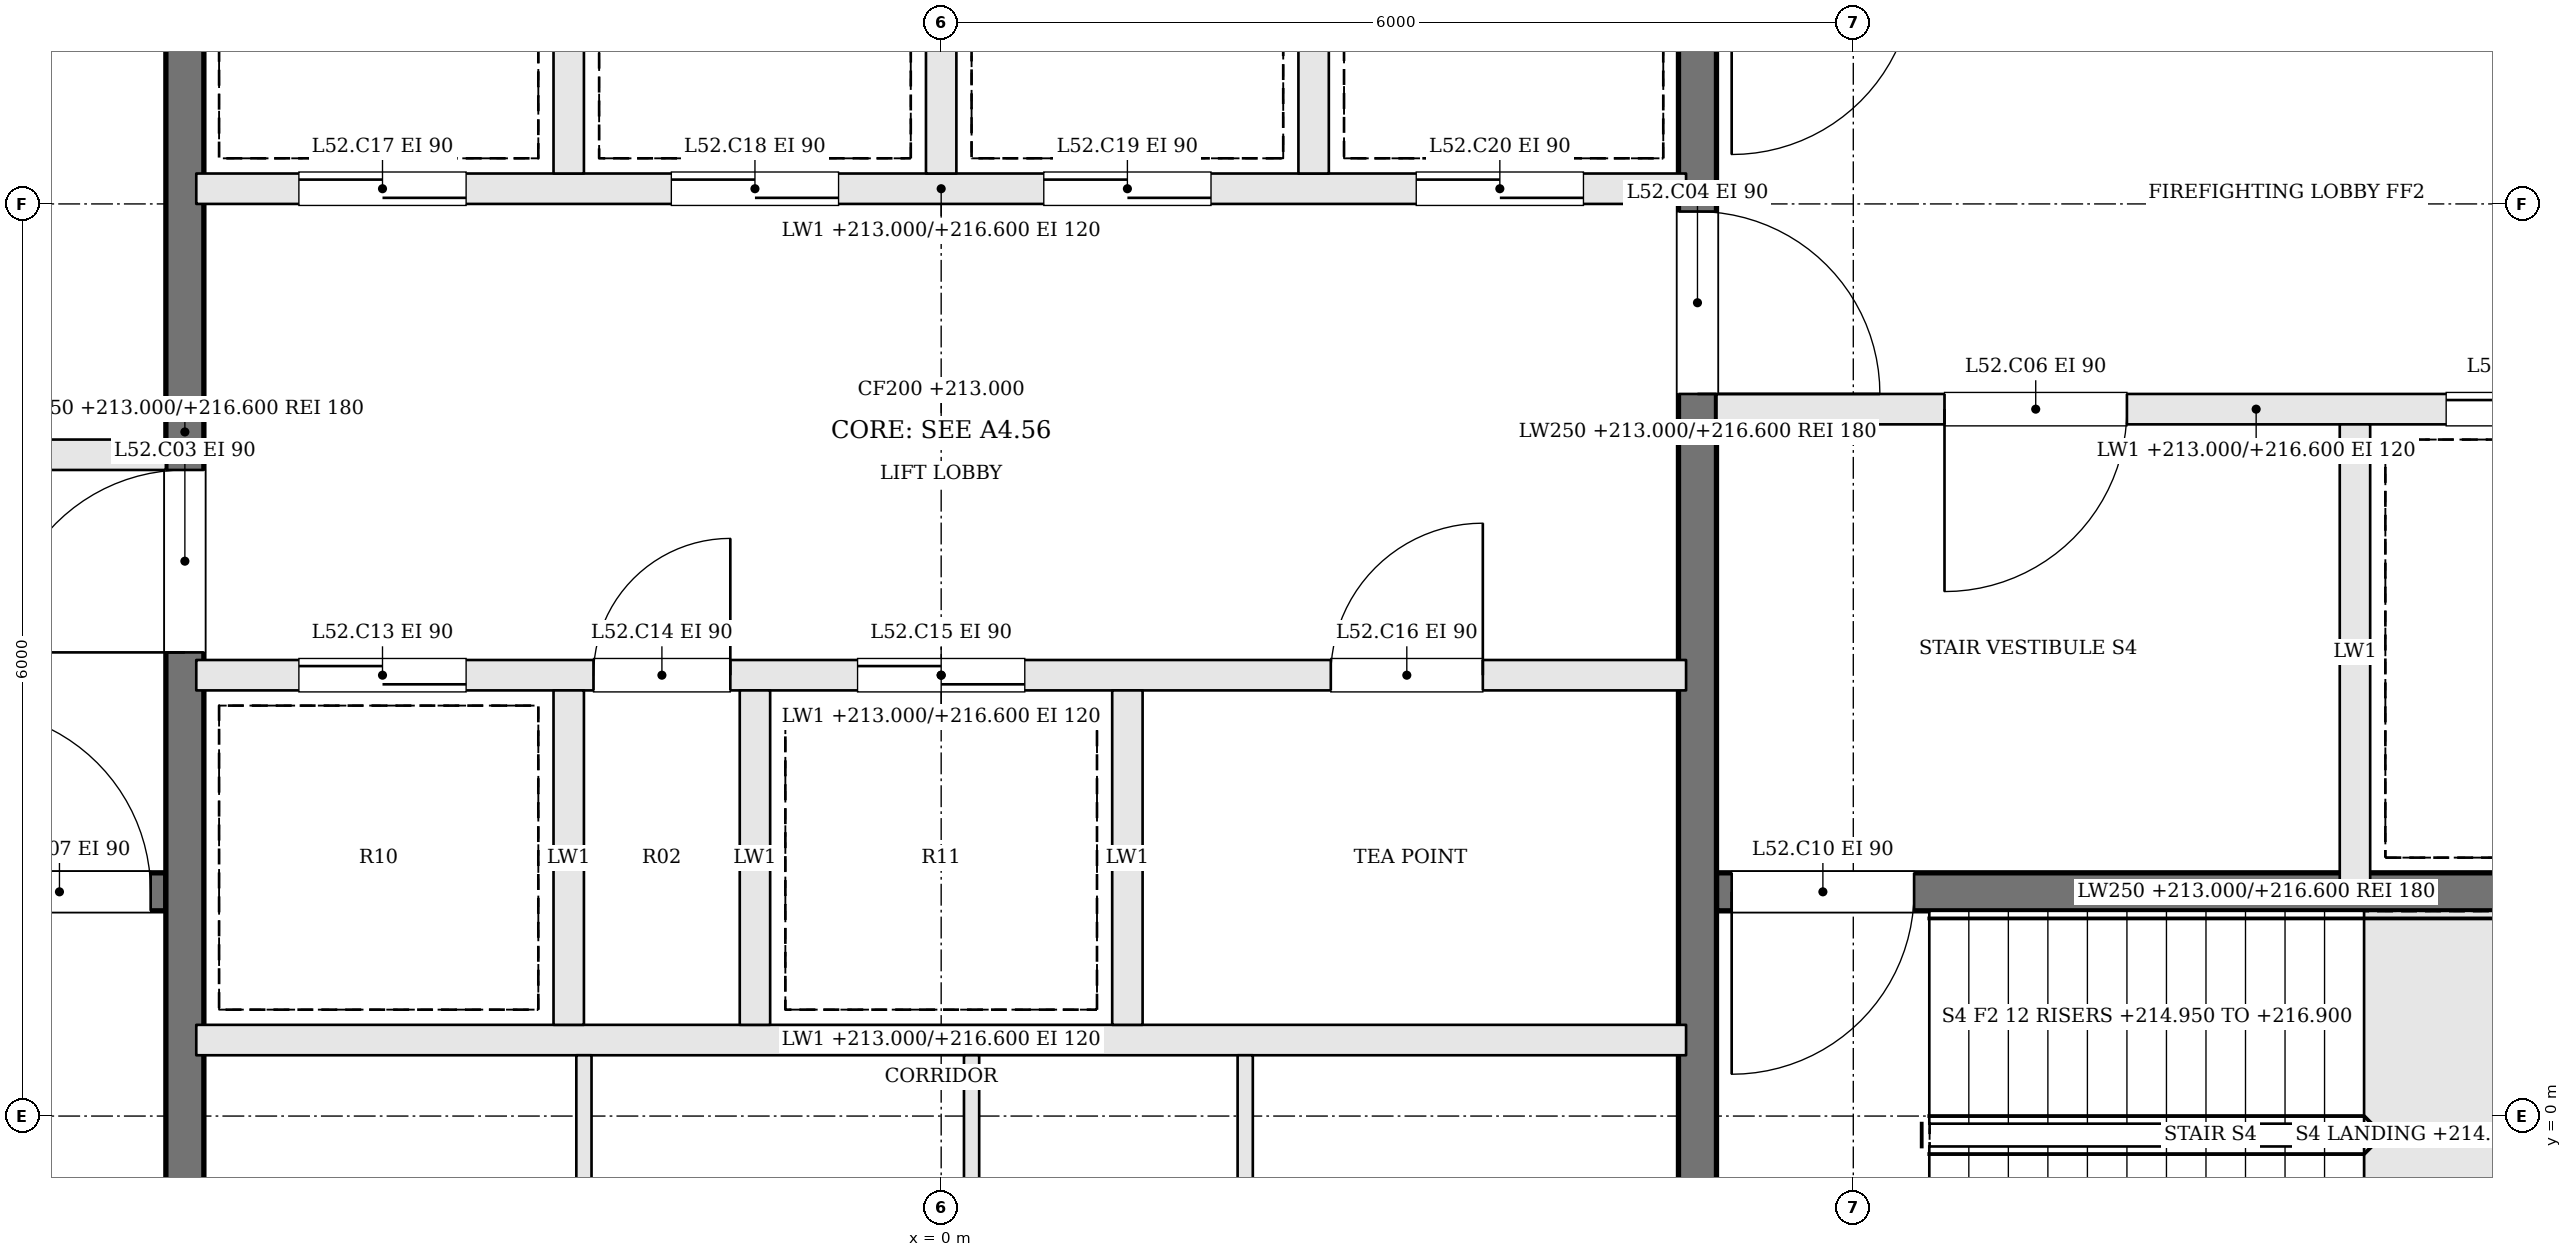
"""IFC4 building model, lengths in metres.
Left out: names, types, materials, properties, quantities, classifications, styles, units other than length and angle.
Written with IfcOpenShell. Run it as: python <this file> out.ifc"""

import sys

from ifc_helpers import new_model, si_unit, direction, frame, frame_2d, origin, place, context, subcontext, project, spatial, rectangle, extrude, element, fill, save


model = new_model("IFC4")
c1 = context("Model", 3, precision=1e-05, world=origin(), true_north=direction((0.0, 1.0)))
c2 = subcontext(c1, "Body", "Model", "MODEL_VIEW")
j1 = project(units=[si_unit("LENGTHUNIT", "METRE"), si_unit("PLANEANGLEUNIT", "RADIAN")], contexts=[c1])
p1 = place(None, origin())
s1 = spatial("IfcSite", under=j1, at=p1, CompositionType="ELEMENT")
p2 = place(p1, origin())
s2 = spatial("IfcBuilding", under=s1, at=p2, CompositionType="ELEMENT")
p3 = place(p2, frame((0.0, 0.0, 213.0)))
s3 = spatial("IfcBuildingStorey", under=s2, at=p3, CompositionType="ELEMENT", Elevation=213.0)
p4 = place(p3, frame((-12.2, 1.475, 0.0), z_axis=(0.0, 0.0, 1.0), x_axis=(1.0, 0.0, 0.0)))
e1 = element("IfcWall", 1, at=p4, inside=s3, PredefinedType="SOLIDWALL", context=c2, shape_type="SweptSolid", body=[
    extrude(rectangle(XDim=7.1, YDim=0.25, at=frame_2d((3.55, 0.0))), origin(), (0.0, 0.0, 1.0), 3.6),
])
p5 = place(p4, frame((5.8, 0.0, 0.0)))
e2 = element("IfcOpeningElement", 2, at=p5, cuts=e1, PredefinedType="OPENING", context=c2, shape_type="SweptSolid", body=[
    extrude(rectangle(XDim=1.2, YDim=2.1, at=frame_2d((0.6, 1.05))), frame((0.0, 0.135, 0.0), z_axis=(0.0, -1.0, 0.0), x_axis=(1.0, 0.0, 0.0)), (0.0, 0.0, 1.0), 0.27),
])
p6 = place(p3, frame((-12.2, 4.35, 0.0), z_axis=(0.0, 0.0, 1.0), x_axis=(1.0, 0.0, 0.0)))
e3 = element("IfcWall", 3, at=p6, inside=s3, PredefinedType="SOLIDWALL", context=c2, shape_type="SweptSolid", body=[
    extrude(rectangle(XDim=7.1, YDim=0.2, at=frame_2d((3.55, 0.0))), origin(), (0.0, 0.0, 1.0), 3.6),
])
p7 = place(p6, frame((4.4, 0.0, 0.0)))
e4 = element("IfcOpeningElement", 4, at=p7, cuts=e3, PredefinedType="OPENING", context=c2, shape_type="SweptSolid", body=[
    extrude(rectangle(XDim=1.2, YDim=2.1, at=frame_2d((0.6, 1.05))), frame((0.0, 0.11, 0.0), z_axis=(0.0, -1.0, 0.0), x_axis=(1.0, 0.0, 0.0)), (0.0, 0.0, 1.0), 0.22),
])
p8 = place(p6, frame((1.1, 0.0, 0.0)))
e5 = element("IfcOpeningElement", 5, at=p8, cuts=e3, PredefinedType="OPENING", context=c2, shape_type="SweptSolid", body=[
    extrude(rectangle(XDim=1.2, YDim=2.1, at=frame_2d((0.6, 1.05))), frame((0.0, 0.11, 0.0), z_axis=(0.0, -1.0, 0.0), x_axis=(1.0, 0.0, 0.0)), (0.0, 0.0, 1.0), 0.22),
])
p9 = place(p3, frame((12.2, 4.65, 0.0), z_axis=(0.0, 0.0, 1.0), x_axis=(-1.0, 0.0, 0.0)))
e6 = element("IfcWall", 6, at=p9, inside=s3, PredefinedType="SOLIDWALL", context=c2, shape_type="SweptSolid", body=[
    extrude(rectangle(XDim=7.1, YDim=0.2, at=frame_2d((3.55, 0.0))), origin(), (0.0, 0.0, 1.0), 3.6),
])
p10 = place(p9, frame((4.4, 0.0, 0.0)))
e7 = element("IfcOpeningElement", 7, at=p10, cuts=e6, PredefinedType="OPENING", context=c2, shape_type="SweptSolid", body=[
    extrude(rectangle(XDim=1.2, YDim=2.1, at=frame_2d((0.6, 1.05))), frame((0.0, 0.11, 0.0), z_axis=(0.0, -1.0, 0.0), x_axis=(1.0, 0.0, 0.0)), (0.0, 0.0, 1.0), 0.22),
])
p11 = place(p9, frame((1.1, 0.0, 0.0)))
e8 = element("IfcOpeningElement", 8, at=p11, cuts=e6, PredefinedType="OPENING", context=c2, shape_type="SweptSolid", body=[
    extrude(rectangle(XDim=1.2, YDim=2.1, at=frame_2d((0.6, 1.05))), frame((0.0, 0.11, 0.0), z_axis=(0.0, -1.0, 0.0), x_axis=(1.0, 0.0, 0.0)), (0.0, 0.0, 1.0), 0.22),
])
p12 = place(p3, frame((12.2, 1.475, 0.0), z_axis=(0.0, 0.0, 1.0), x_axis=(-1.0, 0.0, 0.0)))
e9 = element("IfcWall", 9, at=p12, inside=s3, PredefinedType="SOLIDWALL", context=c2, shape_type="SweptSolid", body=[
    extrude(rectangle(XDim=7.1, YDim=0.25, at=frame_2d((3.55, 0.0))), origin(), (0.0, 0.0, 1.0), 3.6),
])
p13 = place(p12, frame((5.8, 0.0, 0.0)))
e10 = element("IfcOpeningElement", 10, at=p13, cuts=e9, PredefinedType="OPENING", context=c2, shape_type="SweptSolid", body=[
    extrude(rectangle(XDim=1.2, YDim=2.1, at=frame_2d((0.6, 1.05))), frame((0.0, 0.135, 0.0), z_axis=(0.0, -1.0, 0.0), x_axis=(1.0, 0.0, 0.0)), (0.0, 0.0, 1.0), 0.27),
])
p14 = place(p3, frame((9.3, 4.55, 0.0), z_axis=(0.0, 0.0, 1.0), x_axis=(0.0, -1.0, 0.0)))
e11 = element("IfcWall", 11, at=p14, inside=s3, PredefinedType="SOLIDWALL", context=c2, shape_type="SweptSolid", body=[
    extrude(rectangle(XDim=3.0, YDim=0.2, at=frame_2d((1.5, 0.0))), origin(), (0.0, 0.0, 1.0), 3.6),
])
p15 = place(p3, frame((-4.975, -2.2, 0.0), z_axis=(0.0, 0.0, 1.0), x_axis=(0.0, 1.0, 0.0)))
e12 = element("IfcWall", 12, at=p15, inside=s3, PredefinedType="SOLIDWALL", context=c2, shape_type="SweptSolid", body=[
    extrude(rectangle(XDim=13.4, YDim=0.25, at=frame_2d((6.7, 0.0))), origin(), (0.0, 0.0, 1.0), 3.6),
])
p16 = place(p15, frame((5.25, 0.0, 0.0)))
e13 = element("IfcOpeningElement", 13, at=p16, cuts=e12, PredefinedType="OPENING", context=c2, shape_type="SweptSolid", body=[
    extrude(rectangle(XDim=1.2, YDim=2.1, at=frame_2d((0.6, 1.05))), frame((0.0, 0.135, 0.0), z_axis=(0.0, -1.0, 0.0), x_axis=(1.0, 0.0, 0.0)), (0.0, 0.0, 1.0), 0.27),
])
p17 = place(p3, frame((4.975, 11.2, 0.0), z_axis=(0.0, 0.0, 1.0), x_axis=(0.0, -1.0, 0.0)))
e14 = element("IfcWall", 14, at=p17, inside=s3, PredefinedType="SOLIDWALL", context=c2, shape_type="SweptSolid", body=[
    extrude(rectangle(XDim=13.4, YDim=0.25, at=frame_2d((6.7, 0.0))), origin(), (0.0, 0.0, 1.0), 3.6),
])
p18 = place(p17, frame((5.25, 0.0, 0.0)))
e15 = element("IfcOpeningElement", 15, at=p18, cuts=e14, PredefinedType="OPENING", context=c2, shape_type="SweptSolid", body=[
    extrude(rectangle(XDim=1.2, YDim=2.1, at=frame_2d((0.6, 1.05))), frame((0.0, 0.135, 0.0), z_axis=(0.0, -1.0, 0.0), x_axis=(1.0, 0.0, 0.0)), (0.0, 0.0, 1.0), 0.27),
])
p19 = place(p3, frame((-4.9, 0.5, 0.0), z_axis=(0.0, 0.0, 1.0), x_axis=(1.0, 0.0, 0.0)))
e16 = element("IfcWall", 16, at=p19, inside=s3, PredefinedType="SOLIDWALL", context=c2, shape_type="SweptSolid", body=[
    extrude(rectangle(XDim=9.8, YDim=0.2, at=frame_2d((4.9, 0.0))), origin(), (0.0, 0.0, 1.0), 3.6),
])
p20 = place(p3, frame((-4.9, 2.9, 0.0), z_axis=(0.0, 0.0, 1.0), x_axis=(1.0, 0.0, 0.0)))
e17 = element("IfcWall", 17, at=p20, inside=s3, PredefinedType="SOLIDWALL", context=c2, shape_type="SweptSolid", body=[
    extrude(rectangle(XDim=9.8, YDim=0.2, at=frame_2d((4.9, 0.0))), origin(), (0.0, 0.0, 1.0), 3.6),
])
p21 = place(p20, frame((0.675, 0.0, 0.0)))
e18 = element("IfcOpeningElement", 18, at=p21, cuts=e17, PredefinedType="OPENING", context=c2, shape_type="SweptSolid", body=[
    extrude(rectangle(XDim=1.1, YDim=2.1, at=frame_2d((0.55, 1.05))), frame((0.0, 0.11, 0.0), z_axis=(0.0, -1.0, 0.0), x_axis=(1.0, 0.0, 0.0)), (0.0, 0.0, 1.0), 0.22),
])
p22 = place(p20, frame((2.613, 0.0, 0.0)))
e19 = element("IfcOpeningElement", 19, at=p22, cuts=e17, PredefinedType="OPENING", context=c2, shape_type="SweptSolid", body=[
    extrude(rectangle(XDim=0.9, YDim=2.1, at=frame_2d((0.45, 1.05))), frame((0.0, 0.11, 0.0), z_axis=(0.0, -1.0, 0.0), x_axis=(1.0, 0.0, 0.0)), (0.0, 0.0, 1.0), 0.22),
])
p23 = place(p20, frame((4.35, 0.0, 0.0)))
e20 = element("IfcOpeningElement", 20, at=p23, cuts=e17, PredefinedType="OPENING", context=c2, shape_type="SweptSolid", body=[
    extrude(rectangle(XDim=1.1, YDim=2.1, at=frame_2d((0.55, 1.05))), frame((0.0, 0.11, 0.0), z_axis=(0.0, -1.0, 0.0), x_axis=(1.0, 0.0, 0.0)), (0.0, 0.0, 1.0), 0.22),
])
p24 = place(p20, frame((7.463, 0.0, 0.0)))
e21 = element("IfcOpeningElement", 21, at=p24, cuts=e17, PredefinedType="OPENING", context=c2, shape_type="SweptSolid", body=[
    extrude(rectangle(XDim=1.0, YDim=2.1, at=frame_2d((0.5, 1.05))), frame((0.0, 0.11, 0.0), z_axis=(0.0, -1.0, 0.0), x_axis=(1.0, 0.0, 0.0)), (0.0, 0.0, 1.0), 0.22),
])
p25 = place(p3, frame((-4.9, 6.1, 0.0), z_axis=(0.0, 0.0, 1.0), x_axis=(1.0, 0.0, 0.0)))
e22 = element("IfcWall", 22, at=p25, inside=s3, PredefinedType="SOLIDWALL", context=c2, shape_type="SweptSolid", body=[
    extrude(rectangle(XDim=9.8, YDim=0.2, at=frame_2d((4.9, 0.0))), origin(), (0.0, 0.0, 1.0), 3.6),
])
p26 = place(p25, frame((0.675, 0.0, 0.0)))
e23 = element("IfcOpeningElement", 23, at=p26, cuts=e22, PredefinedType="OPENING", context=c2, shape_type="SweptSolid", body=[
    extrude(rectangle(XDim=1.1, YDim=2.1, at=frame_2d((0.55, 1.05))), frame((0.0, 0.11, 0.0), z_axis=(0.0, -1.0, 0.0), x_axis=(1.0, 0.0, 0.0)), (0.0, 0.0, 1.0), 0.22),
])
p27 = place(p25, frame((3.125, 0.0, 0.0)))
e24 = element("IfcOpeningElement", 24, at=p27, cuts=e22, PredefinedType="OPENING", context=c2, shape_type="SweptSolid", body=[
    extrude(rectangle(XDim=1.1, YDim=2.1, at=frame_2d((0.55, 1.05))), frame((0.0, 0.11, 0.0), z_axis=(0.0, -1.0, 0.0), x_axis=(1.0, 0.0, 0.0)), (0.0, 0.0, 1.0), 0.22),
])
p28 = place(p25, frame((5.575, 0.0, 0.0)))
e25 = element("IfcOpeningElement", 25, at=p28, cuts=e22, PredefinedType="OPENING", context=c2, shape_type="SweptSolid", body=[
    extrude(rectangle(XDim=1.1, YDim=2.1, at=frame_2d((0.55, 1.05))), frame((0.0, 0.11, 0.0), z_axis=(0.0, -1.0, 0.0), x_axis=(1.0, 0.0, 0.0)), (0.0, 0.0, 1.0), 0.22),
])
p29 = place(p25, frame((8.025, 0.0, 0.0)))
e26 = element("IfcOpeningElement", 26, at=p29, cuts=e22, PredefinedType="OPENING", context=c2, shape_type="SweptSolid", body=[
    extrude(rectangle(XDim=1.1, YDim=2.1, at=frame_2d((0.55, 1.05))), frame((0.0, 0.11, 0.0), z_axis=(0.0, -1.0, 0.0), x_axis=(1.0, 0.0, 0.0)), (0.0, 0.0, 1.0), 0.22),
])
for number, where, z_axis, x_axis in (
    (27, (-2.45, 0.6, 0.0), (0.0, 0.0, 1.0), (0.0, 1.0, 0.0)),
    (28, (-1.225, 0.6, 0.0), (0.0, 0.0, 1.0), (0.0, 1.0, 0.0)),
    (29, (1.225, 0.6, 0.0), (0.0, 0.0, 1.0), (0.0, 1.0, 0.0)),
    (30, (-2.45, 6.2, 0.0), (0.0, 0.0, 1.0), (0.0, 1.0, 0.0)),
    (31, (0.0, 6.2, 0.0), (0.0, 0.0, 1.0), (0.0, 1.0, 0.0)),
    (32, (2.45, 6.2, 0.0), (0.0, 0.0, 1.0), (0.0, 1.0, 0.0)),
):
    element("IfcWall", number, at=place(p3, frame(where, z_axis=z_axis, x_axis=x_axis)), inside=s3, PredefinedType="SOLIDWALL", context=c2, shape_type="SweptSolid", body=[
        extrude(rectangle(XDim=2.2, YDim=0.2, at=frame_2d((1.1, 0.0))), origin(), (0.0, 0.0, 1.0), 3.6),
    ])
for number, where, z_axis, x_axis in (
    (33, (-2.35, -2.2, 0.0), (0.0, 0.0, 1.0), (0.0, 1.0, 0.0)),
    (34, (0.2, -2.2, 0.0), (0.0, 0.0, 1.0), (0.0, 1.0, 0.0)),
    (35, (2.0, -2.2, 0.0), (0.0, 0.0, 1.0), (0.0, 1.0, 0.0)),
):
    element("IfcWall", number, at=place(p3, frame(where, z_axis=z_axis, x_axis=x_axis)), inside=s3, PredefinedType="PARTITIONING", context=c2, shape_type="SweptSolid", body=[
        extrude(rectangle(XDim=2.6, YDim=0.1, at=frame_2d((1.3, 0.0))), origin(), (0.0, 0.0, 1.0), 3.6),
    ])
p30 = place(p16, origin())
e36 = element("IfcDoor", 36, at=p30, inside=s3, OperationType="SINGLE_SWING_LEFT", PredefinedType="DOOR", context=c2, shape_type="SweptSolid", body=[
    extrude(rectangle(XDim=1.2, YDim=2.1, at=frame_2d((0.6, 1.05))), frame((0.0, 0.025, 0.0), z_axis=(0.0, -1.0, 0.0), x_axis=(1.0, 0.0, 0.0)), (0.0, 0.0, 1.0), 0.05),
])
fill(e13, e36)
p31 = place(p18, origin())
e37 = element("IfcDoor", 37, at=p31, inside=s3, OperationType="SINGLE_SWING_RIGHT", PredefinedType="DOOR", context=c2, shape_type="SweptSolid", body=[
    extrude(rectangle(XDim=1.2, YDim=2.1, at=frame_2d((0.6, 1.05))), frame((0.0, 0.025, 0.0), z_axis=(0.0, -1.0, 0.0), x_axis=(1.0, 0.0, 0.0)), (0.0, 0.0, 1.0), 0.05),
])
fill(e15, e37)
p32 = place(p10, origin())
e38 = element("IfcDoor", 38, at=p32, inside=s3, OperationType="SINGLE_SWING_RIGHT", PredefinedType="DOOR", context=c2, shape_type="SweptSolid", body=[
    extrude(rectangle(XDim=1.2, YDim=2.1, at=frame_2d((0.6, 1.05))), frame((0.0, 0.025, 0.0), z_axis=(0.0, -1.0, 0.0), x_axis=(1.0, 0.0, 0.0)), (0.0, 0.0, 1.0), 0.05),
])
fill(e7, e38)
p33 = place(p5, origin())
e39 = element("IfcDoor", 39, at=p33, inside=s3, OperationType="SINGLE_SWING_LEFT", PredefinedType="DOOR", context=c2, shape_type="SweptSolid", body=[
    extrude(rectangle(XDim=1.2, YDim=2.1, at=frame_2d((0.6, 1.05))), frame((0.0, 0.025, 0.0), z_axis=(0.0, -1.0, 0.0), x_axis=(1.0, 0.0, 0.0)), (0.0, 0.0, 1.0), 0.05),
])
fill(e2, e39)
p34 = place(p13, origin())
e40 = element("IfcDoor", 40, at=p34, inside=s3, OperationType="SINGLE_SWING_RIGHT", PredefinedType="DOOR", context=c2, shape_type="SweptSolid", body=[
    extrude(rectangle(XDim=1.2, YDim=2.1, at=frame_2d((0.6, 1.05))), frame((0.0, 0.025, 0.0), z_axis=(0.0, -1.0, 0.0), x_axis=(1.0, 0.0, 0.0)), (0.0, 0.0, 1.0), 0.05),
])
fill(e10, e40)
p35 = place(p11, origin())
e41 = element("IfcDoor", 41, at=p35, inside=s3, OperationType="SLIDING_TO_RIGHT", PredefinedType="DOOR", context=c2, shape_type="SweptSolid", body=[
    extrude(rectangle(XDim=1.2, YDim=2.1, at=frame_2d((0.6, 1.05))), frame((0.0, 0.025, 0.0), z_axis=(0.0, -1.0, 0.0), x_axis=(1.0, 0.0, 0.0)), (0.0, 0.0, 1.0), 0.05),
])
fill(e8, e41)
p36 = place(p21, origin())
e42 = element("IfcDoor", 42, at=p36, inside=s3, OperationType="SLIDING_TO_RIGHT", PredefinedType="DOOR", context=c2, shape_type="SweptSolid", body=[
    extrude(rectangle(XDim=1.1, YDim=2.1, at=frame_2d((0.55, 1.05))), frame((0.0, 0.025, 0.0), z_axis=(0.0, -1.0, 0.0), x_axis=(1.0, 0.0, 0.0)), (0.0, 0.0, 1.0), 0.05),
])
fill(e18, e42)
p37 = place(p22, origin())
e43 = element("IfcDoor", 43, at=p37, inside=s3, OperationType="SINGLE_SWING_RIGHT", PredefinedType="DOOR", context=c2, shape_type="SweptSolid", body=[
    extrude(rectangle(XDim=0.9, YDim=2.1, at=frame_2d((0.45, 1.05))), frame((0.0, 0.025, 0.0), z_axis=(0.0, -1.0, 0.0), x_axis=(1.0, 0.0, 0.0)), (0.0, 0.0, 1.0), 0.05),
])
fill(e19, e43)
p38 = place(p23, origin())
e44 = element("IfcDoor", 44, at=p38, inside=s3, OperationType="SLIDING_TO_LEFT", PredefinedType="DOOR", context=c2, shape_type="SweptSolid", body=[
    extrude(rectangle(XDim=1.1, YDim=2.1, at=frame_2d((0.55, 1.05))), frame((0.0, 0.025, 0.0), z_axis=(0.0, -1.0, 0.0), x_axis=(1.0, 0.0, 0.0)), (0.0, 0.0, 1.0), 0.05),
])
fill(e20, e44)
p39 = place(p24, origin())
e45 = element("IfcDoor", 45, at=p39, inside=s3, OperationType="SINGLE_SWING_RIGHT", PredefinedType="DOOR", context=c2, shape_type="SweptSolid", body=[
    extrude(rectangle(XDim=1.0, YDim=2.1, at=frame_2d((0.5, 1.05))), frame((0.0, 0.025, 0.0), z_axis=(0.0, -1.0, 0.0), x_axis=(1.0, 0.0, 0.0)), (0.0, 0.0, 1.0), 0.05),
])
fill(e21, e45)
p40 = place(p26, origin())
e46 = element("IfcDoor", 46, at=p40, inside=s3, OperationType="SLIDING_TO_RIGHT", PredefinedType="DOOR", context=c2, shape_type="SweptSolid", body=[
    extrude(rectangle(XDim=1.1, YDim=2.1, at=frame_2d((0.55, 1.05))), frame((0.0, 0.025, 0.0), z_axis=(0.0, -1.0, 0.0), x_axis=(1.0, 0.0, 0.0)), (0.0, 0.0, 1.0), 0.05),
])
fill(e23, e46)
p41 = place(p27, origin())
e47 = element("IfcDoor", 47, at=p41, inside=s3, OperationType="SLIDING_TO_LEFT", PredefinedType="DOOR", context=c2, shape_type="SweptSolid", body=[
    extrude(rectangle(XDim=1.1, YDim=2.1, at=frame_2d((0.55, 1.05))), frame((0.0, 0.025, 0.0), z_axis=(0.0, -1.0, 0.0), x_axis=(1.0, 0.0, 0.0)), (0.0, 0.0, 1.0), 0.05),
])
fill(e24, e47)
p42 = place(p28, origin())
e48 = element("IfcDoor", 48, at=p42, inside=s3, OperationType="SLIDING_TO_RIGHT", PredefinedType="DOOR", context=c2, shape_type="SweptSolid", body=[
    extrude(rectangle(XDim=1.1, YDim=2.1, at=frame_2d((0.55, 1.05))), frame((0.0, 0.025, 0.0), z_axis=(0.0, -1.0, 0.0), x_axis=(1.0, 0.0, 0.0)), (0.0, 0.0, 1.0), 0.05),
])
fill(e25, e48)
p43 = place(p29, origin())
e49 = element("IfcDoor", 49, at=p43, inside=s3, OperationType="SLIDING_TO_LEFT", PredefinedType="DOOR", context=c2, shape_type="SweptSolid", body=[
    extrude(rectangle(XDim=1.1, YDim=2.1, at=frame_2d((0.55, 1.05))), frame((0.0, 0.025, 0.0), z_axis=(0.0, -1.0, 0.0), x_axis=(1.0, 0.0, 0.0)), (0.0, 0.0, 1.0), 0.05),
])
fill(e26, e49)
save(model, sys.argv[1])
